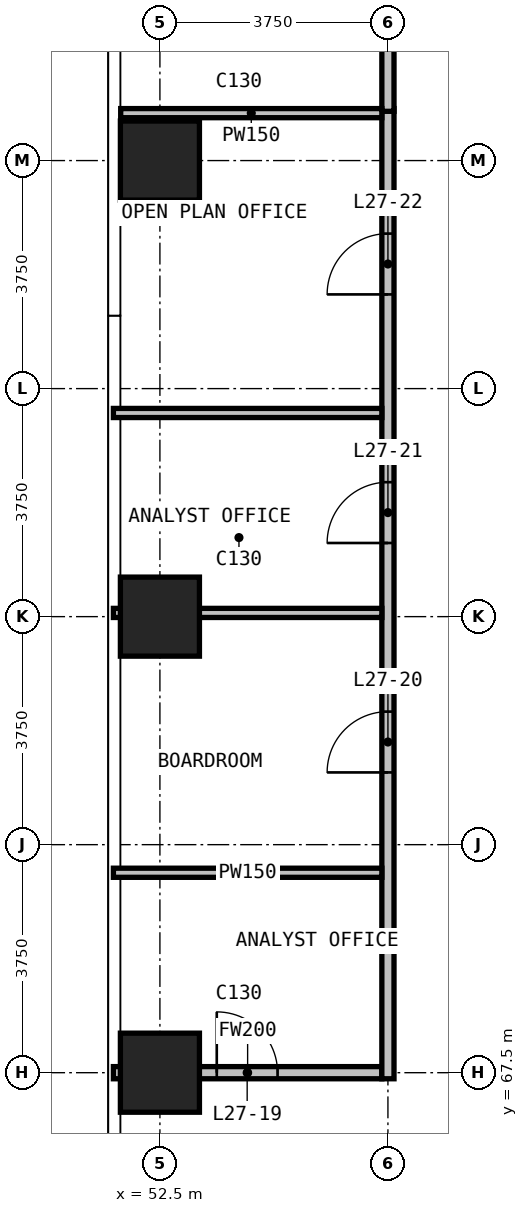
"""IFC4 building model, lengths in metres.
Left out: names, types, materials, properties, quantities, classifications, styles, units other than length and angle.
Written with IfcOpenShell. Run it as: python <this file> out.ifc"""

import sys

from ifc_helpers import new_model, si_unit, direction, frame, frame_2d, origin, origin_2d, place, context, subcontext, project, spatial, rectangle, extrude, element, fill, save


model = new_model("IFC4")
c1 = context("Model", 3, precision=1e-05, world=origin(), true_north=direction((0.0, 1.0)))
c2 = subcontext(c1, "Body", "Model", "MODEL_VIEW")
j1 = project(units=[si_unit("LENGTHUNIT", "METRE"), si_unit("PLANEANGLEUNIT", "RADIAN")], contexts=[c1])
p1 = place(None, origin())
s1 = spatial("IfcSite", under=j1, at=p1, CompositionType="ELEMENT")
p2 = place(p1, origin())
s2 = spatial("IfcBuilding", under=s1, at=p2, CompositionType="ELEMENT")
p3 = place(p2, frame((0.0, 0.0, 110.8)))
s3 = spatial("IfcBuildingStorey", under=s2, at=p3, CompositionType="ELEMENT", Elevation=110.8)
for number, where, z_axis, x_axis in (
    (1, (52.5, 67.5, 0.0), (0.0, 0.0, 1.0), (1.0, 0.0, 0.0)),
    (2, (52.5, 75.0, 0.0), (0.0, 0.0, 1.0), (1.0, 0.0, 0.0)),
    (3, (52.5, 82.5, 0.0), (0.0, 0.0, 1.0), (1.0, 0.0, 0.0)),
):
    element("IfcColumn", number, at=place(p3, frame(where, z_axis=z_axis, x_axis=x_axis)), inside=s3, PredefinedType="COLUMN", context=c2, shape_type="SweptSolid", body=[
        extrude(rectangle(XDim=1.3, YDim=1.3, at=origin_2d()), origin(), (0.0, 0.0, 1.0), 3.6),
    ])
p4 = place(p3, frame((51.735, 67.5, 0.0), z_axis=(0.0, 0.0, 1.0), x_axis=(1.0, 0.0, 0.0)))
e4 = element("IfcWall", 4, at=p4, inside=s3, PredefinedType="PARTITIONING", context=c2, shape_type="SweptSolid", body=[
    extrude(rectangle(XDim=4.415, YDim=0.2, at=frame_2d((2.208, 0.0))), origin(), (0.0, 0.0, 1.0), 3.3),
])
p5 = place(p4, frame((1.7, 0.0, 0.0)))
e5 = element("IfcOpeningElement", 5, at=p5, cuts=e4, PredefinedType="OPENING", context=c2, shape_type="SweptSolid", body=[
    extrude(rectangle(XDim=1.0, YDim=2.2, at=frame_2d((0.5, 1.1))), frame((0.0, 0.11, 0.0), z_axis=(0.0, -1.0, 0.0), x_axis=(1.0, 0.0, 0.0)), (0.0, 0.0, 1.0), 0.22),
])
p6 = place(p3, frame((56.25, 67.4, 0.0), z_axis=(0.0, 0.0, 1.0), x_axis=(0.0, 1.0, 0.0)))
e6 = element("IfcWall", 6, at=p6, inside=s3, PredefinedType="PARTITIONING", context=c2, shape_type="SweptSolid", body=[
    extrude(rectangle(XDim=15.955, YDim=0.2, at=frame_2d((7.978, 0.0))), origin(), (0.0, 0.0, 1.0), 3.3),
])
p7 = place(p6, frame((5.038, 0.0, 0.0)))
e7 = element("IfcOpeningElement", 7, at=p7, cuts=e6, PredefinedType="OPENING", context=c2, shape_type="SweptSolid", body=[
    extrude(rectangle(XDim=1.0, YDim=2.2, at=frame_2d((0.5, 1.1))), frame((0.0, 0.11, 0.0), z_axis=(0.0, -1.0, 0.0), x_axis=(1.0, 0.0, 0.0)), (0.0, 0.0, 1.0), 0.22),
])
p8 = place(p6, frame((8.811, 0.0, 0.0)))
e8 = element("IfcOpeningElement", 8, at=p8, cuts=e6, PredefinedType="OPENING", context=c2, shape_type="SweptSolid", body=[
    extrude(rectangle(XDim=1.0, YDim=2.2, at=frame_2d((0.5, 1.1))), frame((0.0, 0.11, 0.0), z_axis=(0.0, -1.0, 0.0), x_axis=(1.0, 0.0, 0.0)), (0.0, 0.0, 1.0), 0.22),
])
p9 = place(p6, frame((12.899, 0.0, 0.0)))
e9 = element("IfcOpeningElement", 9, at=p9, cuts=e6, PredefinedType="OPENING", context=c2, shape_type="SweptSolid", body=[
    extrude(rectangle(XDim=1.0, YDim=2.2, at=frame_2d((0.5, 1.1))), frame((0.0, 0.11, 0.0), z_axis=(0.0, -1.0, 0.0), x_axis=(1.0, 0.0, 0.0)), (0.0, 0.0, 1.0), 0.22),
])
p10 = place(p3, frame((56.25, 83.31, 0.0), z_axis=(0.0, 0.0, 1.0), x_axis=(0.0, 1.0, 0.0)))
e10 = element("IfcWall", 10, at=p10, inside=s3, PredefinedType="PARTITIONING", context=c2, shape_type="SweptSolid", body=[
    extrude(rectangle(XDim=7.335, YDim=0.2, at=frame_2d((3.667, 0.0))), origin(), (0.0, 0.0, 1.0), 3.3),
])
for number, where, z_axis, x_axis in (
    (11, (51.735, 70.788, 0.0), (0.0, 0.0, 1.0), (1.0, 0.0, 0.0)),
    (12, (51.735, 75.061, 0.0), (0.0, 0.0, 1.0), (1.0, 0.0, 0.0)),
    (13, (51.735, 78.349, 0.0), (0.0, 0.0, 1.0), (1.0, 0.0, 0.0)),
):
    element("IfcWall", number, at=place(p3, frame(where, z_axis=z_axis, x_axis=x_axis)), inside=s3, PredefinedType="PARTITIONING", context=c2, shape_type="SweptSolid", body=[
        extrude(rectangle(XDim=4.415, YDim=0.15, at=frame_2d((2.208, 0.0))), origin(), (0.0, 0.0, 1.0), 3.3),
    ])
p11 = place(p3, frame((51.855, 83.28, 0.0), z_axis=(0.0, 0.0, 1.0), x_axis=(1.0, 0.0, 0.0)))
e14 = element("IfcWall", 14, at=p11, inside=s3, PredefinedType="PARTITIONING", context=c2, shape_type="SweptSolid", body=[
    extrude(rectangle(XDim=4.295, YDim=0.15, at=frame_2d((2.147, 0.0))), origin(), (0.0, 0.0, 1.0), 3.3),
])
p12 = place(p5, origin())
e15 = element("IfcDoor", 15, at=p12, inside=s3, OperationType="SINGLE_SWING_RIGHT", PredefinedType="DOOR", context=c2, shape_type="SweptSolid", body=[
    extrude(rectangle(XDim=1.0, YDim=2.2, at=frame_2d((0.5, 1.1))), frame((0.0, 0.025, 0.0), z_axis=(0.0, -1.0, 0.0), x_axis=(1.0, 0.0, 0.0)), (0.0, 0.0, 1.0), 0.05),
])
fill(e5, e15)
p13 = place(p7, origin())
e16 = element("IfcDoor", 16, at=p13, inside=s3, OperationType="SINGLE_SWING_RIGHT", PredefinedType="DOOR", context=c2, shape_type="SweptSolid", body=[
    extrude(rectangle(XDim=1.0, YDim=2.2, at=frame_2d((0.5, 1.1))), frame((0.0, 0.025, 0.0), z_axis=(0.0, -1.0, 0.0), x_axis=(1.0, 0.0, 0.0)), (0.0, 0.0, 1.0), 0.05),
])
fill(e7, e16)
p14 = place(p8, origin())
e17 = element("IfcDoor", 17, at=p14, inside=s3, OperationType="SINGLE_SWING_LEFT", PredefinedType="DOOR", context=c2, shape_type="SweptSolid", body=[
    extrude(rectangle(XDim=1.0, YDim=2.2, at=frame_2d((0.5, 1.1))), frame((0.0, 0.025, 0.0), z_axis=(0.0, -1.0, 0.0), x_axis=(1.0, 0.0, 0.0)), (0.0, 0.0, 1.0), 0.05),
])
fill(e8, e17)
p15 = place(p9, origin())
e18 = element("IfcDoor", 18, at=p15, inside=s3, OperationType="SINGLE_SWING_RIGHT", PredefinedType="DOOR", context=c2, shape_type="SweptSolid", body=[
    extrude(rectangle(XDim=1.0, YDim=2.2, at=frame_2d((0.5, 1.1))), frame((0.0, 0.025, 0.0), z_axis=(0.0, -1.0, 0.0), x_axis=(1.0, 0.0, 0.0)), (0.0, 0.0, 1.0), 0.05),
])
fill(e9, e18)
save(model, sys.argv[1])
